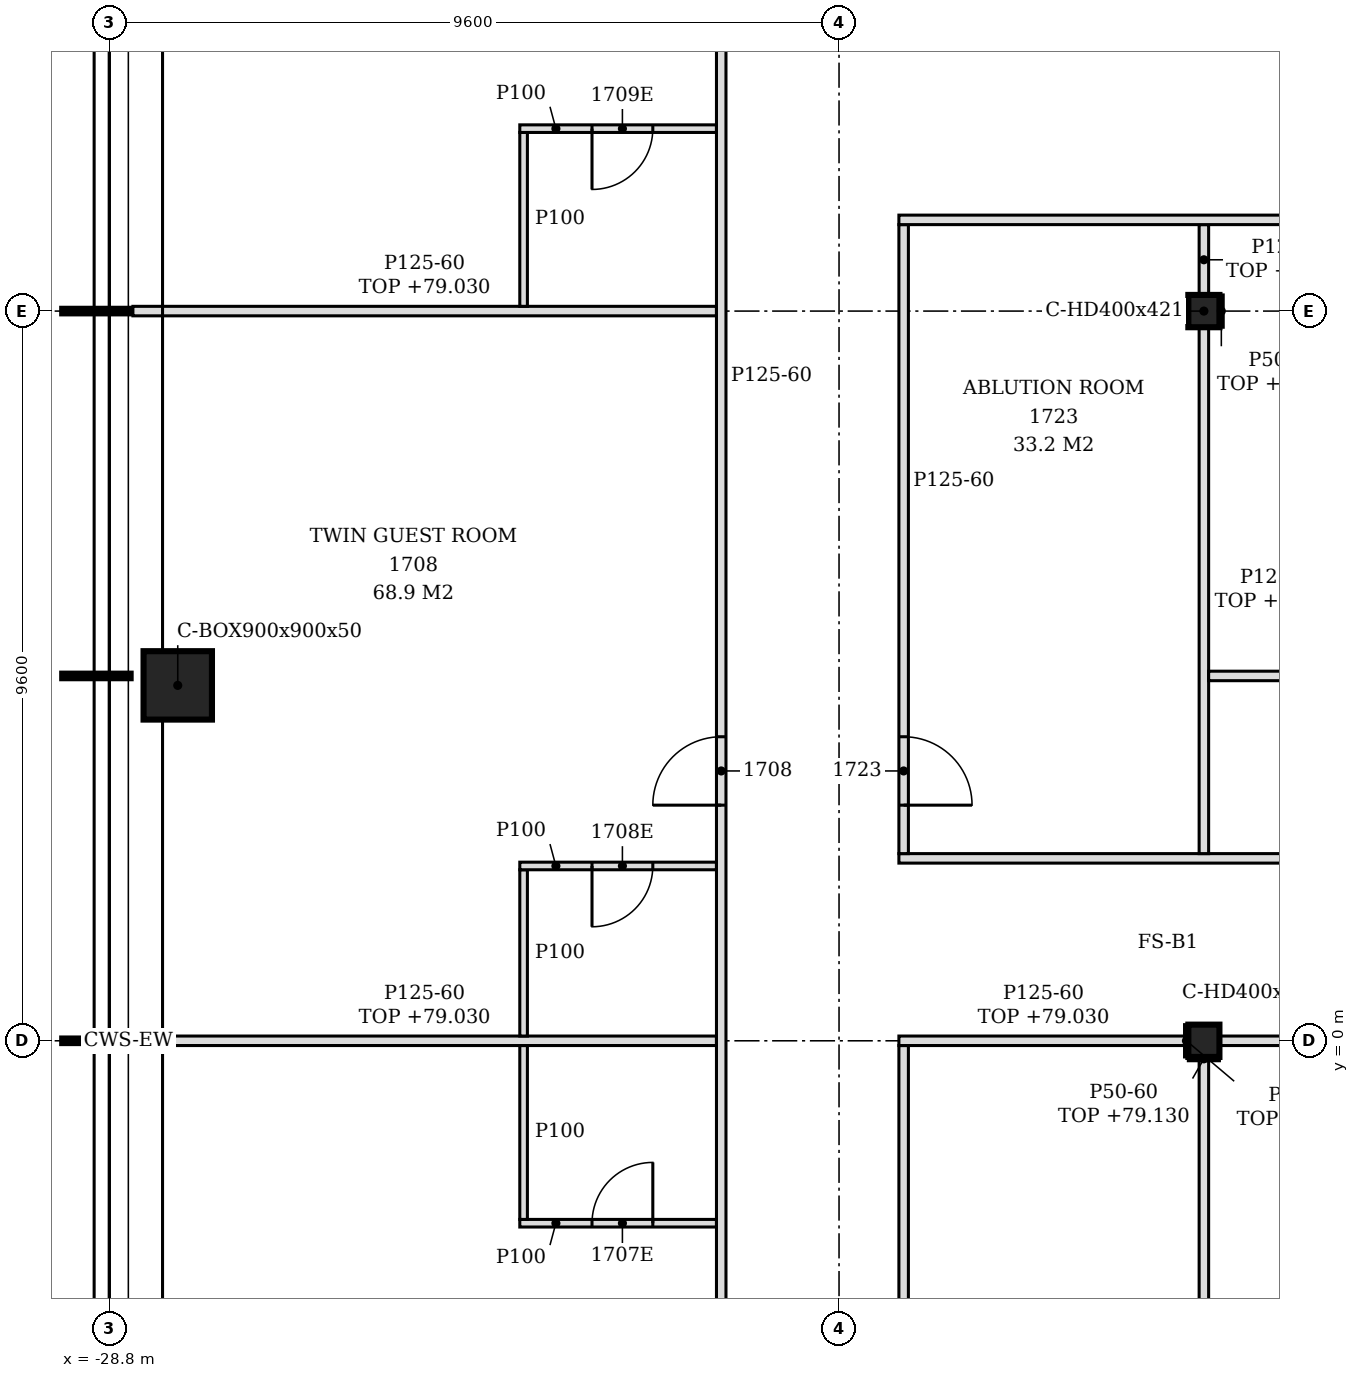
"""IFC4 building model, lengths in metres.
Left out: names, types, materials, properties, quantities, classifications, styles, units other than length and angle.
Written with IfcOpenShell. Run it as: python <this file> out.ifc"""

import sys

from ifc_helpers import new_model, si_unit, direction, frame, frame_2d, origin, origin_2d, place, context, subcontext, project, spatial, polyline, rectangle, hollow_rectangle, i_section, outline, extrude, element, fill, save


model = new_model("IFC4")
c1 = context("Model", 3, precision=1e-05, world=origin(), true_north=direction((0.0, 1.0)))
c2 = subcontext(c1, "Body", "Model", "MODEL_VIEW")
j1 = project(units=[si_unit("LENGTHUNIT", "METRE"), si_unit("PLANEANGLEUNIT", "RADIAN")], contexts=[c1])
p1 = place(None, origin())
s1 = spatial("IfcSite", under=j1, at=p1, CompositionType="ELEMENT")
p2 = place(p1, origin())
s2 = spatial("IfcBuilding", under=s1, at=p2, CompositionType="ELEMENT")
p3 = place(p2, frame((0.0, 0.0, 76.2)))
s3 = spatial("IfcBuildingStorey", under=s2, at=p3, CompositionType="ELEMENT", Elevation=76.2)
p4 = place(p3, frame((-27.9, 4.676, -0.15), z_axis=(0.0, 0.0, 1.0), x_axis=(1.0, 0.0, 0.0)))
e1 = element("IfcColumn", 1, at=p4, inside=s3, PredefinedType="COLUMN", context=c2, shape_type="SweptSolid", body=[
    extrude(hollow_rectangle(XDim=0.9, YDim=0.9, WallThickness=0.05, at=origin_2d()), origin(), (0.0, 0.0, 1.0), 3.6),
])
for number, where, z_axis, x_axis in (
    (2, (-14.4, 0.0, -0.15), (0.0, 0.0, 1.0), (1.0, 0.0, 0.0)),
    (3, (-14.4, 9.6, -0.15), (0.0, 0.0, 1.0), (1.0, 0.0, 0.0)),
):
    element("IfcColumn", number, at=place(p3, frame(where, z_axis=z_axis, x_axis=x_axis)), inside=s3, PredefinedType="COLUMN", context=c2, shape_type="SweptSolid", body=[
        extrude(i_section(OverallWidth=0.409, OverallDepth=0.425, WebThickness=0.033, FlangeThickness=0.052, FilletRadius=0.015, at=origin_2d()), origin(), (0.0, 0.0, 1.0), 3.6),
    ])
p5 = place(p3, frame((-20.75, -17.887, 0.0), z_axis=(0.0, 0.0, 1.0), x_axis=(0.0, 1.0, 0.0)))
e4 = element("IfcWall", 4, at=p5, inside=s3, PredefinedType="PARTITIONING", context=c2, shape_type="SweptSolid", body=[
    extrude(outline(polyline([(0.0, 0.0), (39.876, 0.0), (39.876, 3.45), (39.622, 3.45), (39.62, 2.63), (38.507, 2.63), (38.505, 3.45), (37.183, 3.45), (37.18, 2.98), (36.992, 2.98), (36.99, 3.45), (32.397, 3.45), (32.396, 2.83), (32.177, 2.83), (32.176, 3.45), (27.597, 3.45), (27.595, 2.83), (27.377, 2.83), (27.375, 3.45), (22.798, 3.45), (22.795, 2.83), (22.577, 2.83), (22.575, 3.45), (17.998, 3.45), (17.996, 2.83), (17.778, 2.83), (17.775, 3.45), (13.198, 3.45), (13.196, 2.83), (12.978, 2.83), (12.976, 3.45), (8.397, 3.45), (8.396, 2.83), (8.177, 2.83), (8.176, 3.45), (3.597, 3.45), (3.595, 2.83), (3.377, 2.83), (3.375, 3.45), (0.0, 3.45), (0.0, 0.0)])), frame((0.0, 0.062, 0.0), z_axis=(0.0, -1.0, 0.0), x_axis=(1.0, 0.0, 0.0)), (0.0, 0.0, 1.0), 0.125),
])
p6 = place(p5, frame((4.738, 0.0, 0.0)))
e5 = element("IfcOpeningElement", 5, at=p6, cuts=e4, PredefinedType="OPENING", context=c2, shape_type="SweptSolid", body=[
    extrude(rectangle(XDim=0.9, YDim=2.1, at=frame_2d((0.45, 1.05))), frame((0.0, 0.073, 0.0), z_axis=(0.0, -1.0, 0.0), x_axis=(1.0, 0.0, 0.0)), (0.0, 0.0, 1.0), 0.145),
])
p7 = place(p5, frame((13.387, 0.0, 0.0)))
e6 = element("IfcOpeningElement", 6, at=p7, cuts=e4, PredefinedType="OPENING", context=c2, shape_type="SweptSolid", body=[
    extrude(rectangle(XDim=0.9, YDim=2.1, at=frame_2d((0.45, 1.05))), frame((0.0, 0.073, 0.0), z_axis=(0.0, -1.0, 0.0), x_axis=(1.0, 0.0, 0.0)), (0.0, 0.0, 1.0), 0.145),
])
p8 = place(p5, frame((20.988, 0.0, 0.0)))
e7 = element("IfcOpeningElement", 7, at=p8, cuts=e4, PredefinedType="OPENING", context=c2, shape_type="SweptSolid", body=[
    extrude(rectangle(XDim=0.9, YDim=2.1, at=frame_2d((0.45, 1.05))), frame((0.0, 0.073, 0.0), z_axis=(0.0, -1.0, 0.0), x_axis=(1.0, 0.0, 0.0)), (0.0, 0.0, 1.0), 0.145),
])
p9 = place(p5, frame((31.387, 0.0, 0.0)))
e8 = element("IfcOpeningElement", 8, at=p9, cuts=e4, PredefinedType="OPENING", context=c2, shape_type="SweptSolid", body=[
    extrude(rectangle(XDim=0.9, YDim=2.1, at=frame_2d((0.45, 1.05))), frame((0.0, 0.073, 0.0), z_axis=(0.0, -1.0, 0.0), x_axis=(1.0, 0.0, 0.0)), (0.0, 0.0, 1.0), 0.145),
])
p10 = place(p3, frame((-18.35, -15.488, 0.0), z_axis=(0.0, 0.0, 1.0), x_axis=(0.0, 1.0, 0.0)))
e9 = element("IfcWall", 9, at=p10, inside=s3, PredefinedType="PARTITIONING", context=c2, shape_type="SweptSolid", body=[
    extrude(outline(polyline([(0.0, 0.0), (15.425, 0.0), (15.425, 2.83), (15.377, 2.83), (15.375, 3.45), (10.798, 3.45), (10.795, 2.83), (10.577, 2.83), (10.575, 3.45), (5.998, 3.45), (5.996, 2.83), (5.778, 2.83), (5.775, 3.45), (1.198, 3.45), (1.196, 2.83), (0.978, 2.83), (0.976, 3.45), (0.0, 3.45), (0.0, 0.0)])), frame((0.0, 0.062, 0.0), z_axis=(0.0, -1.0, 0.0), x_axis=(1.0, 0.0, 0.0)), (0.0, 0.0, 1.0), 0.125),
])
p11 = place(p10, frame((10.988, 0.0, 0.0)))
e10 = element("IfcOpeningElement", 10, at=p11, cuts=e9, PredefinedType="OPENING", context=c2, shape_type="SweptSolid", body=[
    extrude(rectangle(XDim=0.8, YDim=2.1, at=frame_2d((0.4, 1.05))), frame((0.0, 0.073, 0.0), z_axis=(0.0, -1.0, 0.0), x_axis=(1.0, 0.0, 0.0)), (0.0, 0.0, 1.0), 0.145),
])
p12 = place(p3, frame((-14.4, -9.387, 0.0), z_axis=(0.0, 0.0, 1.0), x_axis=(0.0, 1.0, 0.0)))
e11 = element("IfcWall", 11, at=p12, inside=s3, PredefinedType="PARTITIONING", context=c2, shape_type="SweptSolid", body=[
    extrude(rectangle(XDim=9.175, YDim=0.125, at=frame_2d((4.587, 0.0))), origin(), (0.0, 0.0, 1.0), 2.93),
])
p13 = place(p3, frame((-23.4, -2.4, 0.0), z_axis=(0.0, 0.0, 1.0), x_axis=(1.0, 0.0, 0.0)))
e12 = element("IfcWall", 12, at=p13, inside=s3, PredefinedType="PARTITIONING", context=c2, shape_type="SweptSolid", body=[
    extrude(rectangle(XDim=2.587, YDim=0.1, at=frame_2d((1.294, 0.0))), origin(), (0.0, 0.0, 1.0), 3.45),
])
p14 = place(p13, frame((0.95, 0.0, 0.0)))
e13 = element("IfcOpeningElement", 13, at=p14, cuts=e12, PredefinedType="OPENING", context=c2, shape_type="SweptSolid", body=[
    extrude(rectangle(XDim=0.8, YDim=2.1, at=frame_2d((0.4, 1.05))), frame((0.0, 0.06, 0.0), z_axis=(0.0, -1.0, 0.0), x_axis=(1.0, 0.0, 0.0)), (0.0, 0.0, 1.0), 0.12),
])
p15 = place(p3, frame((-23.35, -2.35, 0.0), z_axis=(0.0, 0.0, 1.0), x_axis=(0.0, 1.0, 0.0)))
e14 = element("IfcWall", 14, at=p15, inside=s3, PredefinedType="PARTITIONING", context=c2, shape_type="SweptSolid", body=[
    extrude(outline(polyline([(0.0, 0.0), (2.288, 0.0), (2.288, 2.83), (2.24, 2.83), (2.238, 3.45), (0.0, 3.45), (0.0, 0.0)])), frame((0.0, 0.05, 0.0), z_axis=(0.0, -1.0, 0.0), x_axis=(1.0, 0.0, 0.0)), (0.0, 0.0, 1.0), 0.1),
])
p16 = place(p3, frame((-28.49, 0.0, 0.0), z_axis=(0.0, 0.0, 1.0), x_axis=(1.0, 0.0, 0.0)))
e15 = element("IfcWall", 15, at=p16, inside=s3, PredefinedType="PARTITIONING", context=c2, shape_type="SweptSolid", body=[
    extrude(rectangle(XDim=7.677, YDim=0.125, at=frame_2d((3.839, 0.0))), origin(), (0.0, 0.0, 1.0), 2.83),
])
p17 = place(p3, frame((-18.413, 0.0, 0.0), z_axis=(0.0, 0.0, 1.0), x_axis=(1.0, 0.0, 0.0)))
e16 = element("IfcWall", 16, at=p17, inside=s3, PredefinedType="PARTITIONING", context=c2, shape_type="SweptSolid", body=[
    extrude(rectangle(XDim=3.808, YDim=0.125, at=frame_2d((1.904, 0.0))), origin(), (0.0, 0.0, 1.0), 2.83),
])
p18 = place(p3, frame((-14.196, 0.0, 0.0), z_axis=(0.0, 0.0, 1.0), x_axis=(1.0, 0.0, 0.0)))
e17 = element("IfcWall", 17, at=p18, inside=s3, PredefinedType="PARTITIONING", context=c2, shape_type="SweptSolid", body=[
    extrude(outline(polyline([(0.0, 0.0), (9.458, 0.0), (9.458, 2.83), (9.246, 2.83), (9.243, 2.93), (0.0, 2.93), (0.0, 0.0)])), frame((0.0, 0.062, 0.0), z_axis=(0.0, -1.0, 0.0), x_axis=(1.0, 0.0, 0.0)), (0.0, 0.0, 1.0), 0.125),
])
p19 = place(p18, frame((8.196, 0.0, 0.0)))
e18 = element("IfcOpeningElement", 18, at=p19, cuts=e17, PredefinedType="OPENING", context=c2, shape_type="SweptSolid", body=[
    extrude(rectangle(XDim=0.9, YDim=2.1, at=frame_2d((0.45, 1.05))), frame((0.0, 0.073, 0.0), z_axis=(0.0, -1.0, 0.0), x_axis=(1.0, 0.0, 0.0)), (0.0, 0.0, 1.0), 0.145),
])
p20 = place(p3, frame((-23.35, 0.062, 0.0), z_axis=(0.0, 0.0, 1.0), x_axis=(0.0, 1.0, 0.0)))
e19 = element("IfcWall", 19, at=p20, inside=s3, PredefinedType="PARTITIONING", context=c2, shape_type="SweptSolid", body=[
    extrude(outline(polyline([(0.0, 0.0), (2.188, 0.0), (2.188, 3.45), (0.048, 3.45), (0.045, 2.83), (0.0, 2.83), (0.0, 0.0)])), frame((0.0, 0.05, 0.0), z_axis=(0.0, -1.0, 0.0), x_axis=(1.0, 0.0, 0.0)), (0.0, 0.0, 1.0), 0.1),
])
p21 = place(p3, frame((-23.4, 2.3, 0.0), z_axis=(0.0, 0.0, 1.0), x_axis=(1.0, 0.0, 0.0)))
e20 = element("IfcWall", 20, at=p21, inside=s3, PredefinedType="PARTITIONING", context=c2, shape_type="SweptSolid", body=[
    extrude(rectangle(XDim=2.587, YDim=0.1, at=frame_2d((1.294, 0.0))), origin(), (0.0, 0.0, 1.0), 3.45),
])
p22 = place(p21, frame((0.95, 0.0, 0.0)))
e21 = element("IfcOpeningElement", 21, at=p22, cuts=e20, PredefinedType="OPENING", context=c2, shape_type="SweptSolid", body=[
    extrude(rectangle(XDim=0.8, YDim=2.1, at=frame_2d((0.4, 1.05))), frame((0.0, 0.06, 0.0), z_axis=(0.0, -1.0, 0.0), x_axis=(1.0, 0.0, 0.0)), (0.0, 0.0, 1.0), 0.12),
])
p23 = place(p3, frame((-18.413, 2.4, 0.0), z_axis=(0.0, 0.0, 1.0), x_axis=(1.0, 0.0, 0.0)))
e22 = element("IfcWall", 22, at=p23, inside=s3, PredefinedType="PARTITIONING", context=c2, shape_type="SweptSolid", body=[
    extrude(outline(polyline([(0.0, 0.0), (13.401, 0.0), (13.4, 3.45), (4.163, 3.45), (4.16, 2.93), (3.863, 2.93), (3.861, 3.45), (0.0, 3.45), (0.0, 0.0)])), frame((0.0, 0.062, 0.0), z_axis=(0.0, -1.0, 0.0), x_axis=(1.0, 0.0, 0.0)), (0.0, 0.0, 1.0), 0.125),
])
p24 = place(p23, frame((11.812, 0.0, 0.0)))
e23 = element("IfcOpeningElement", 23, at=p24, cuts=e22, PredefinedType="OPENING", context=c2, shape_type="SweptSolid", body=[
    extrude(rectangle(XDim=0.8, YDim=2.1, at=frame_2d((0.4, 1.05))), frame((0.0, 0.073, 0.0), z_axis=(0.0, -1.0, 0.0), x_axis=(1.0, 0.0, 0.0)), (0.0, 0.0, 1.0), 0.145),
])
p25 = place(p3, frame((-18.35, 2.462, 0.0), z_axis=(0.0, 0.0, 1.0), x_axis=(0.0, 1.0, 0.0)))
e24 = element("IfcWall", 24, at=p25, inside=s3, PredefinedType="PARTITIONING", context=c2, shape_type="SweptSolid", body=[
    extrude(outline(polyline([(0.0, 0.0), (8.275, 0.0), (8.275, 3.45), (7.248, 3.45), (7.246, 2.83), (7.028, 2.83), (7.025, 3.45), (2.448, 3.45), (2.446, 2.83), (2.228, 2.83), (2.226, 3.45), (0.0, 3.45), (0.0, 0.0)])), frame((0.0, 0.062, 0.0), z_axis=(0.0, -1.0, 0.0), x_axis=(1.0, 0.0, 0.0)), (0.0, 0.0, 1.0), 0.125),
])
p26 = place(p25, frame((0.637, 0.0, 0.0)))
e25 = element("IfcOpeningElement", 25, at=p26, cuts=e24, PredefinedType="OPENING", context=c2, shape_type="SweptSolid", body=[
    extrude(rectangle(XDim=0.9, YDim=2.1, at=frame_2d((0.45, 1.05))), frame((0.0, 0.073, 0.0), z_axis=(0.0, -1.0, 0.0), x_axis=(1.0, 0.0, 0.0)), (0.0, 0.0, 1.0), 0.145),
])
p27 = place(p3, frame((-14.4, 2.462, 0.0), z_axis=(0.0, 0.0, 1.0), x_axis=(0.0, 1.0, 0.0)))
e26 = element("IfcWall", 26, at=p27, inside=s3, PredefinedType="PARTITIONING", context=c2, shape_type="SweptSolid", body=[
    extrude(rectangle(XDim=6.925, YDim=0.125, at=frame_2d((3.462, 0.0))), origin(), (0.0, 0.0, 1.0), 2.93),
])
p28 = place(p3, frame((-14.337, 4.8, 0.0), z_axis=(0.0, 0.0, 1.0), x_axis=(1.0, 0.0, 0.0)))
e27 = element("IfcWall", 27, at=p28, inside=s3, PredefinedType="PARTITIONING", context=c2, shape_type="SweptSolid", body=[
    extrude(outline(polyline([(0.0, 0.0), (9.475, 0.0), (9.475, 2.83), (9.387, 2.83), (9.385, 2.93), (0.0, 2.93), (0.0, 0.0)])), frame((0.0, 0.062, 0.0), z_axis=(0.0, -1.0, 0.0), x_axis=(1.0, 0.0, 0.0)), (0.0, 0.0, 1.0), 0.125),
])
p29 = place(p3, frame((-28.49, 9.6, 0.0), z_axis=(0.0, 0.0, 1.0), x_axis=(1.0, 0.0, 0.0)))
e28 = element("IfcWall", 28, at=p29, inside=s3, PredefinedType="PARTITIONING", context=c2, shape_type="SweptSolid", body=[
    extrude(rectangle(XDim=7.677, YDim=0.125, at=frame_2d((3.839, 0.0))), origin(), (0.0, 0.0, 1.0), 2.83),
])
p30 = place(p3, frame((-23.35, 9.663, 0.0), z_axis=(0.0, 0.0, 1.0), x_axis=(0.0, 1.0, 0.0)))
e29 = element("IfcWall", 29, at=p30, inside=s3, PredefinedType="PARTITIONING", context=c2, shape_type="SweptSolid", body=[
    extrude(outline(polyline([(0.0, 0.0), (2.287, 0.0), (2.288, 3.45), (0.048, 3.45), (0.045, 2.83), (0.0, 2.83), (0.0, 0.0)])), frame((0.0, 0.05, 0.0), z_axis=(0.0, -1.0, 0.0), x_axis=(1.0, 0.0, 0.0)), (0.0, 0.0, 1.0), 0.1),
])
p31 = place(p3, frame((-14.4, 9.812, 0.0), z_axis=(0.0, 0.0, 1.0), x_axis=(0.0, 1.0, 0.0)))
e30 = element("IfcWall", 30, at=p31, inside=s3, PredefinedType="PARTITIONING", context=c2, shape_type="SweptSolid", body=[
    extrude(rectangle(XDim=0.925, YDim=0.125, at=frame_2d((0.462, 0.0))), origin(), (0.0, 0.0, 1.0), 2.93),
])
p32 = place(p3, frame((-18.413, 10.8, 0.0), z_axis=(0.0, 0.0, 1.0), x_axis=(1.0, 0.0, 0.0)))
e31 = element("IfcWall", 31, at=p32, inside=s3, PredefinedType="PARTITIONING", context=c2, shape_type="SweptSolid", body=[
    extrude(outline(polyline([(0.0, 0.0), (13.675, 0.0), (13.675, 2.83), (13.462, 2.83), (13.46, 3.45), (4.163, 3.45), (4.16, 2.93), (3.863, 2.93), (3.861, 3.45), (0.0, 3.45), (0.0, 0.0)])), frame((0.0, 0.062, 0.0), z_axis=(0.0, -1.0, 0.0), x_axis=(1.0, 0.0, 0.0)), (0.0, 0.0, 1.0), 0.125),
])
p33 = place(p32, frame((12.512, 0.0, 0.0)))
e32 = element("IfcOpeningElement", 32, at=p33, cuts=e31, PredefinedType="OPENING", context=c2, shape_type="SweptSolid", body=[
    extrude(rectangle(XDim=0.8, YDim=2.1, at=frame_2d((0.4, 1.05))), frame((0.0, 0.073, 0.0), z_axis=(0.0, -1.0, 0.0), x_axis=(1.0, 0.0, 0.0)), (0.0, 0.0, 1.0), 0.145),
])
p34 = place(p3, frame((-23.4, 12.0, 0.0), z_axis=(0.0, 0.0, 1.0), x_axis=(1.0, 0.0, 0.0)))
e33 = element("IfcWall", 33, at=p34, inside=s3, PredefinedType="PARTITIONING", context=c2, shape_type="SweptSolid", body=[
    extrude(rectangle(XDim=2.587, YDim=0.1, at=frame_2d((1.294, 0.0))), origin(), (0.0, 0.0, 1.0), 3.45),
])
p35 = place(p34, frame((0.95, 0.0, 0.0)))
e34 = element("IfcOpeningElement", 34, at=p35, cuts=e33, PredefinedType="OPENING", context=c2, shape_type="SweptSolid", body=[
    extrude(rectangle(XDim=0.8, YDim=2.1, at=frame_2d((0.4, 1.05))), frame((0.0, 0.06, 0.0), z_axis=(0.0, -1.0, 0.0), x_axis=(1.0, 0.0, 0.0)), (0.0, 0.0, 1.0), 0.12),
])
p36 = place(p3, frame((-14.629, -0.212, 0.0), z_axis=(0.0, 0.0, 1.0), x_axis=(0.0, 1.0, 0.0)))
e35 = element("IfcWall", 35, at=p36, inside=s3, PredefinedType="PARTITIONING", context=c2, shape_type="SweptSolid", body=[
    extrude(rectangle(XDim=0.425, YDim=0.05, at=frame_2d((0.212, 0.0))), origin(), (0.0, 0.0, 1.0), 2.83),
])
p37 = place(p3, frame((-14.604, -0.238, 0.0), z_axis=(0.0, 0.0, 1.0), x_axis=(1.0, 0.0, 0.0)))
e36 = element("IfcWall", 36, at=p37, inside=s3, PredefinedType="PARTITIONING", context=c2, shape_type="SweptSolid", body=[
    extrude(rectangle(XDim=0.409, YDim=0.05, at=frame_2d((0.205, 0.0))), origin(), (0.0, 0.0, 1.0), 2.93),
])
p38 = place(p3, frame((-14.17, 9.387, 0.0), z_axis=(0.0, 0.0, 1.0), x_axis=(0.0, 1.0, 0.0)))
e37 = element("IfcWall", 37, at=p38, inside=s3, PredefinedType="PARTITIONING", context=c2, shape_type="SweptSolid", body=[
    extrude(rectangle(XDim=0.425, YDim=0.05, at=frame_2d((0.212, 0.0))), origin(), (0.0, 0.0, 1.0), 2.93),
])
p39 = place(p14, origin())
e38 = element("IfcDoor", 38, at=p39, inside=s3, OperationType="SINGLE_SWING_RIGHT", PredefinedType="DOOR", context=c2, shape_type="SweptSolid", body=[
    extrude(rectangle(XDim=0.8, YDim=2.1, at=frame_2d((0.4, 1.05))), frame((0.0, 0.025, 0.0), z_axis=(0.0, -1.0, 0.0), x_axis=(1.0, 0.0, 0.0)), (0.0, 0.0, 1.0), 0.05),
])
fill(e13, e38)
p40 = place(p8, origin())
e39 = element("IfcDoor", 39, at=p40, inside=s3, OperationType="SINGLE_SWING_LEFT", PredefinedType="DOOR", context=c2, shape_type="SweptSolid", body=[
    extrude(rectangle(XDim=0.9, YDim=2.1, at=frame_2d((0.45, 1.05))), frame((0.0, 0.025, 0.0), z_axis=(0.0, -1.0, 0.0), x_axis=(1.0, 0.0, 0.0)), (0.0, 0.0, 1.0), 0.05),
])
fill(e7, e39)
p41 = place(p22, frame((0.8, 0.0, 0.0), z_axis=(0.0, 0.0, 1.0), x_axis=(-1.0, 0.0, 0.0)))
e40 = element("IfcDoor", 40, at=p41, inside=s3, OperationType="SINGLE_SWING_RIGHT", PredefinedType="DOOR", context=c2, shape_type="SweptSolid", body=[
    extrude(rectangle(XDim=0.8, YDim=2.1, at=frame_2d((0.4, 1.05))), frame((0.0, 0.025, 0.0), z_axis=(0.0, -1.0, 0.0), x_axis=(1.0, 0.0, 0.0)), (0.0, 0.0, 1.0), 0.05),
])
fill(e21, e40)
p42 = place(p35, frame((0.8, 0.0, 0.0), z_axis=(0.0, 0.0, 1.0), x_axis=(-1.0, 0.0, 0.0)))
e41 = element("IfcDoor", 41, at=p42, inside=s3, OperationType="SINGLE_SWING_RIGHT", PredefinedType="DOOR", context=c2, shape_type="SweptSolid", body=[
    extrude(rectangle(XDim=0.8, YDim=2.1, at=frame_2d((0.4, 1.05))), frame((0.0, 0.025, 0.0), z_axis=(0.0, -1.0, 0.0), x_axis=(1.0, 0.0, 0.0)), (0.0, 0.0, 1.0), 0.05),
])
fill(e34, e41)
p43 = place(p26, frame((0.9, 0.0, 0.0), z_axis=(0.0, 0.0, 1.0), x_axis=(-1.0, 0.0, 0.0)))
e42 = element("IfcDoor", 42, at=p43, inside=s3, OperationType="SINGLE_SWING_RIGHT", PredefinedType="DOOR", context=c2, shape_type="SweptSolid", body=[
    extrude(rectangle(XDim=0.9, YDim=2.1, at=frame_2d((0.45, 1.05))), frame((0.0, 0.025, 0.0), z_axis=(0.0, -1.0, 0.0), x_axis=(1.0, 0.0, 0.0)), (0.0, 0.0, 1.0), 0.05),
])
fill(e25, e42)
save(model, sys.argv[1])
